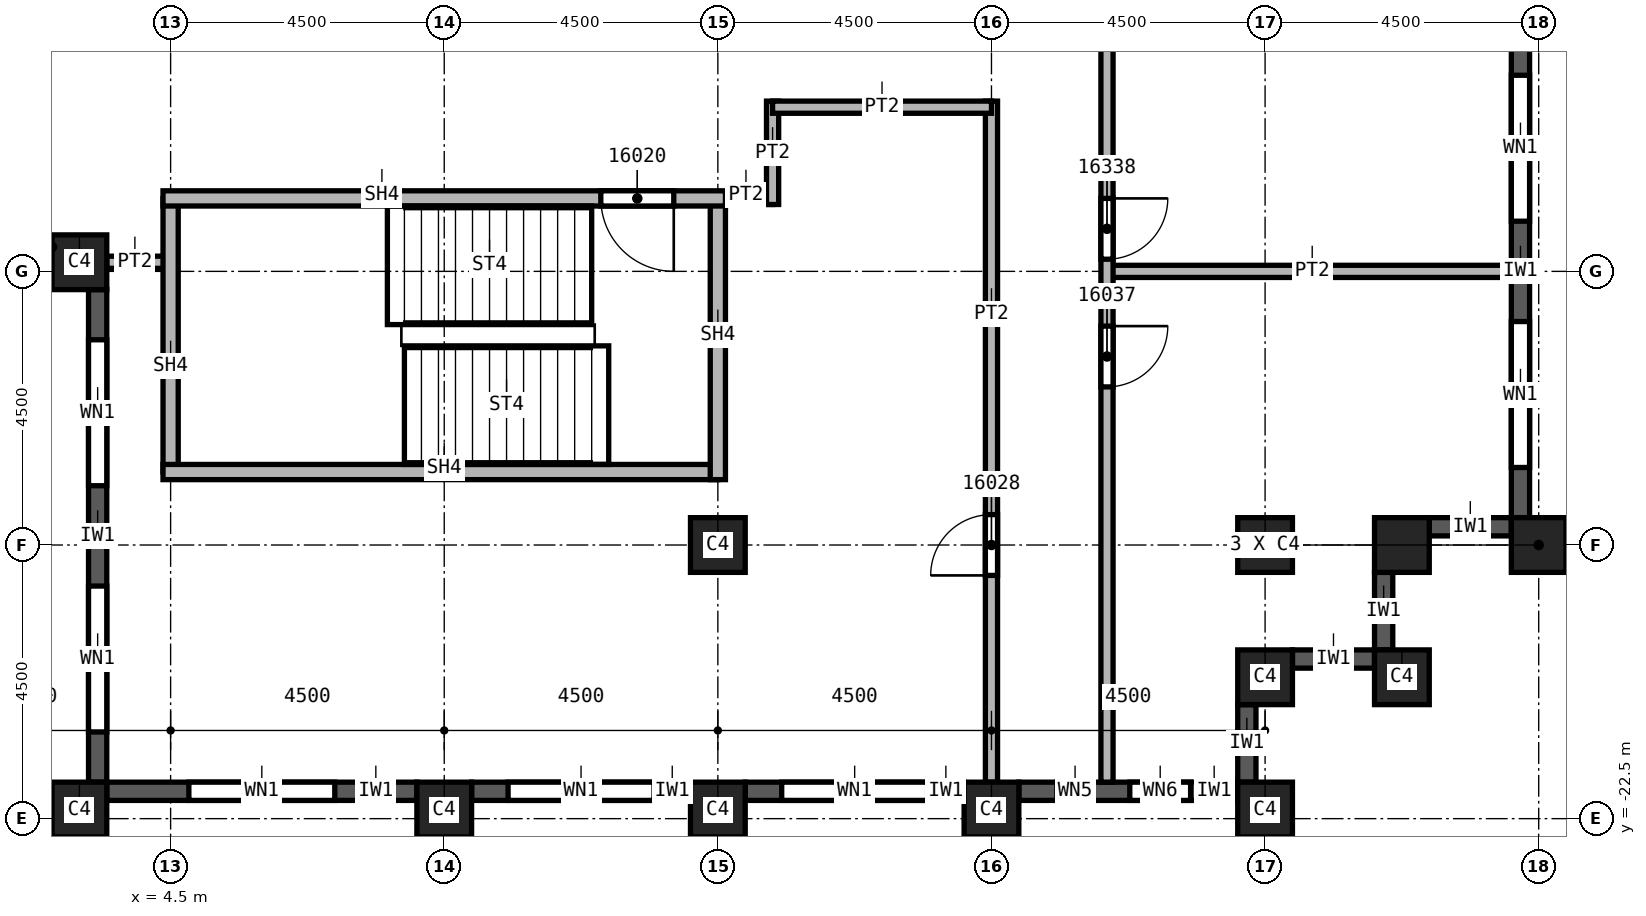
"""IFC4 building model, lengths in metres.
Left out: names, types, materials, properties, quantities, classifications, styles, units other than length and angle.
Written with IfcOpenShell. Run it as: python <this file> out.ifc"""

import sys

from ifc_helpers import new_model, si_unit, direction, frame, frame_2d, origin, origin_2d, place, context, subcontext, project, spatial, rectangle, extrude, element, fill, save


model = new_model("IFC4")
c1 = context("Model", 3, precision=1e-05, world=origin(), true_north=direction((0.0, 1.0)))
c2 = subcontext(c1, "Body", "Model", "MODEL_VIEW")
j1 = project(units=[si_unit("LENGTHUNIT", "METRE"), si_unit("PLANEANGLEUNIT", "RADIAN")], contexts=[c1])
p1 = place(None, origin())
s1 = spatial("IfcSite", under=j1, at=p1, CompositionType="ELEMENT")
p2 = place(p1, origin())
s2 = spatial("IfcBuilding", under=s1, at=p2, CompositionType="ELEMENT")
p3 = place(p2, frame((0.0, 0.0, 246.0)))
s3 = spatial("IfcBuildingStorey", under=s2, at=p3, CompositionType="ELEMENT", Elevation=246.0)
for number, where, z_axis, x_axis in (
    (1, (13.5, -18.0, 0.0), (0.0, 0.0, 1.0), (1.0, 0.0, 0.0)),
    (2, (22.5, -18.0, 0.0), (0.0, 0.0, 1.0), (1.0, 0.0, 0.0)),
    (3, (27.0, -18.0, 0.0), (0.0, 0.0, 1.0), (0.0, 1.0, 0.0)),
    (4, (3.0, -22.35, 0.0), (0.0, 0.0, 1.0), (1.0, 0.0, 0.0)),
    (5, (9.0, -22.35, 0.0), (0.0, 0.0, 1.0), (1.0, 0.0, 0.0)),
    (6, (13.5, -22.35, 0.0), (0.0, 0.0, 1.0), (1.0, 0.0, 0.0)),
    (7, (18.0, -22.35, 0.0), (0.0, 0.0, 1.0), (1.0, 0.0, 0.0)),
    (8, (22.5, -22.35, 0.0), (0.0, 0.0, 1.0), (1.0, 0.0, 0.0)),
    (9, (3.0, -13.35, 0.0), (0.0, 0.0, 1.0), (1.0, 0.0, 0.0)),
    (10, (22.5, -20.175, 0.0), (0.0, 0.0, 1.0), (1.0, 0.0, 0.0)),
    (11, (24.75, -20.175, 0.0), (0.0, 0.0, 1.0), (1.0, 0.0, 0.0)),
    (12, (24.75, -18.0, 0.0), (0.0, 0.0, 1.0), (1.0, 0.0, 0.0)),
):
    element("IfcColumn", number, at=place(p3, frame(where, z_axis=z_axis, x_axis=x_axis)), inside=s3, PredefinedType="COLUMN", context=c2, shape_type="SweptSolid", body=[
        extrude(rectangle(XDim=0.9, YDim=0.9, at=origin_2d()), origin(), (0.0, 0.0, 1.0), 3.72),
    ])
p4 = place(p3, frame((3.3, -13.8, 0.0), z_axis=(0.0, 0.0, 1.0), x_axis=(0.0, -1.0, 0.0)))
e13 = element("IfcWall", 13, at=p4, inside=s3, PredefinedType="SOLIDWALL", context=c2, shape_type="SweptSolid", body=[
    extrude(rectangle(XDim=8.1, YDim=0.3, at=frame_2d((4.05, 0.0))), origin(), (0.0, 0.0, 1.0), 3.12),
])
p5 = place(p4, frame((0.825, 0.0, 0.8)))
e14 = element("IfcOpeningElement", 14, at=p5, cuts=e13, PredefinedType="OPENING", context=c2, shape_type="SweptSolid", body=[
    extrude(rectangle(XDim=2.4, YDim=1.95, at=frame_2d((1.2, 0.975))), frame((0.0, 0.15, 0.0), z_axis=(0.0, -1.0, 0.0), x_axis=(1.0, 0.0, 0.0)), (0.0, 0.0, 1.0), 0.3),
])
p6 = place(p4, frame((4.875, 0.0, 0.8)))
e15 = element("IfcOpeningElement", 15, at=p6, cuts=e13, PredefinedType="OPENING", context=c2, shape_type="SweptSolid", body=[
    extrude(rectangle(XDim=2.4, YDim=1.95, at=frame_2d((1.2, 0.975))), frame((0.0, 0.15, 0.0), z_axis=(0.0, -1.0, 0.0), x_axis=(1.0, 0.0, 0.0)), (0.0, 0.0, 1.0), 0.3),
])
p7 = place(p3, frame((3.45, -22.05, 0.0), z_axis=(0.0, 0.0, 1.0), x_axis=(1.0, 0.0, 0.0)))
e16 = element("IfcWall", 16, at=p7, inside=s3, PredefinedType="SOLIDWALL", context=c2, shape_type="SweptSolid", body=[
    extrude(rectangle(XDim=5.1, YDim=0.3, at=frame_2d((2.55, 0.0))), origin(), (0.0, 0.0, 1.0), 3.12),
])
p8 = place(p7, frame((1.35, 0.0, 0.8)))
e17 = element("IfcOpeningElement", 17, at=p8, cuts=e16, PredefinedType="OPENING", context=c2, shape_type="SweptSolid", body=[
    extrude(rectangle(XDim=2.4, YDim=1.95, at=frame_2d((1.2, 0.975))), frame((0.0, 0.15, 0.0), z_axis=(0.0, -1.0, 0.0), x_axis=(1.0, 0.0, 0.0)), (0.0, 0.0, 1.0), 0.3),
])
p9 = place(p3, frame((9.45, -22.05, 0.0), z_axis=(0.0, 0.0, 1.0), x_axis=(1.0, 0.0, 0.0)))
e18 = element("IfcWall", 18, at=p9, inside=s3, PredefinedType="SOLIDWALL", context=c2, shape_type="SweptSolid", body=[
    extrude(rectangle(XDim=3.6, YDim=0.3, at=frame_2d((1.8, 0.0))), origin(), (0.0, 0.0, 1.0), 3.12),
])
p10 = place(p9, frame((0.6, 0.0, 0.8)))
e19 = element("IfcOpeningElement", 19, at=p10, cuts=e18, PredefinedType="OPENING", context=c2, shape_type="SweptSolid", body=[
    extrude(rectangle(XDim=2.4, YDim=1.95, at=frame_2d((1.2, 0.975))), frame((0.0, 0.15, 0.0), z_axis=(0.0, -1.0, 0.0), x_axis=(1.0, 0.0, 0.0)), (0.0, 0.0, 1.0), 0.3),
])
p11 = place(p3, frame((13.95, -22.05, 0.0), z_axis=(0.0, 0.0, 1.0), x_axis=(1.0, 0.0, 0.0)))
e20 = element("IfcWall", 20, at=p11, inside=s3, PredefinedType="SOLIDWALL", context=c2, shape_type="SweptSolid", body=[
    extrude(rectangle(XDim=3.6, YDim=0.3, at=frame_2d((1.8, 0.0))), origin(), (0.0, 0.0, 1.0), 3.12),
])
p12 = place(p11, frame((0.6, 0.0, 0.8)))
e21 = element("IfcOpeningElement", 21, at=p12, cuts=e20, PredefinedType="OPENING", context=c2, shape_type="SweptSolid", body=[
    extrude(rectangle(XDim=2.4, YDim=1.95, at=frame_2d((1.2, 0.975))), frame((0.0, 0.15, 0.0), z_axis=(0.0, -1.0, 0.0), x_axis=(1.0, 0.0, 0.0)), (0.0, 0.0, 1.0), 0.3),
])
p13 = place(p3, frame((18.45, -22.05, 0.0), z_axis=(0.0, 0.0, 1.0), x_axis=(1.0, 0.0, 0.0)))
e22 = element("IfcWall", 22, at=p13, inside=s3, PredefinedType="SOLIDWALL", context=c2, shape_type="SweptSolid", body=[
    extrude(rectangle(XDim=3.6, YDim=0.3, at=frame_2d((1.8, 0.0))), origin(), (0.0, 0.0, 1.0), 3.12),
])
p14 = place(p13, frame((0.625, 0.0, 0.8)))
e23 = element("IfcOpeningElement", 23, at=p14, cuts=e22, PredefinedType="OPENING", context=c2, shape_type="SweptSolid", body=[
    extrude(rectangle(XDim=0.6, YDim=1.95, at=frame_2d((0.3, 0.975))), frame((0.0, 0.15, 0.0), z_axis=(0.0, -1.0, 0.0), x_axis=(1.0, 0.0, 0.0)), (0.0, 0.0, 1.0), 0.3),
])
p15 = place(p13, frame((1.825, 0.0, 0.8)))
e24 = element("IfcOpeningElement", 24, at=p15, cuts=e22, PredefinedType="OPENING", context=c2, shape_type="SweptSolid", body=[
    extrude(rectangle(XDim=1.0, YDim=1.95, at=frame_2d((0.5, 0.975))), frame((0.0, 0.15, 0.0), z_axis=(0.0, -1.0, 0.0), x_axis=(1.0, 0.0, 0.0)), (0.0, 0.0, 1.0), 0.3),
])
p16 = place(p3, frame((22.2, -21.9, 0.0), z_axis=(0.0, 0.0, 1.0), x_axis=(0.0, 1.0, 0.0)))
e25 = element("IfcWall", 25, at=p16, inside=s3, PredefinedType="SOLIDWALL", context=c2, shape_type="SweptSolid", body=[
    extrude(rectangle(XDim=1.275, YDim=0.3, at=frame_2d((0.637, 0.0))), origin(), (0.0, 0.0, 1.0), 3.12),
])
p17 = place(p3, frame((22.95, -19.875, 0.0), z_axis=(0.0, 0.0, 1.0), x_axis=(1.0, 0.0, 0.0)))
e26 = element("IfcWall", 26, at=p17, inside=s3, PredefinedType="SOLIDWALL", context=c2, shape_type="SweptSolid", body=[
    extrude(rectangle(XDim=1.35, YDim=0.3, at=frame_2d((0.675, 0.0))), origin(), (0.0, 0.0, 1.0), 3.12),
])
p18 = place(p3, frame((24.45, -19.725, 0.0), z_axis=(0.0, 0.0, 1.0), x_axis=(0.0, 1.0, 0.0)))
e27 = element("IfcWall", 27, at=p18, inside=s3, PredefinedType="SOLIDWALL", context=c2, shape_type="SweptSolid", body=[
    extrude(rectangle(XDim=1.275, YDim=0.3, at=frame_2d((0.638, 0.0))), origin(), (0.0, 0.0, 1.0), 3.12),
])
p19 = place(p3, frame((25.2, -17.7, 0.0), z_axis=(0.0, 0.0, 1.0), x_axis=(1.0, 0.0, 0.0)))
e28 = element("IfcWall", 28, at=p19, inside=s3, PredefinedType="SOLIDWALL", context=c2, shape_type="SweptSolid", body=[
    extrude(rectangle(XDim=1.35, YDim=0.3, at=frame_2d((0.675, 0.0))), origin(), (0.0, 0.0, 1.0), 3.12),
])
p20 = place(p3, frame((26.7, -17.55, 0.0), z_axis=(0.0, 0.0, 1.0), x_axis=(0.0, 1.0, 0.0)))
e29 = element("IfcWall", 29, at=p20, inside=s3, PredefinedType="SOLIDWALL", context=c2, shape_type="SweptSolid", body=[
    extrude(rectangle(XDim=8.1, YDim=0.3, at=frame_2d((4.05, 0.0))), origin(), (0.0, 0.0, 1.0), 3.12),
])
p21 = place(p20, frame((0.825, 0.0, 0.8)))
e30 = element("IfcOpeningElement", 30, at=p21, cuts=e29, PredefinedType="OPENING", context=c2, shape_type="SweptSolid", body=[
    extrude(rectangle(XDim=2.4, YDim=1.95, at=frame_2d((1.2, 0.975))), frame((0.0, 0.15, 0.0), z_axis=(0.0, -1.0, 0.0), x_axis=(1.0, 0.0, 0.0)), (0.0, 0.0, 1.0), 0.3),
])
p22 = place(p20, frame((4.875, 0.0, 0.8)))
e31 = element("IfcOpeningElement", 31, at=p22, cuts=e29, PredefinedType="OPENING", context=c2, shape_type="SweptSolid", body=[
    extrude(rectangle(XDim=2.4, YDim=1.95, at=frame_2d((1.2, 0.975))), frame((0.0, 0.15, 0.0), z_axis=(0.0, -1.0, 0.0), x_axis=(1.0, 0.0, 0.0)), (0.0, 0.0, 1.0), 0.3),
])
p23 = place(p3, frame((4.5, -13.35, 0.0), z_axis=(0.0, 0.0, 1.0), x_axis=(-1.0, 0.0, 0.0)))
e32 = element("IfcWall", 32, at=p23, inside=s3, PredefinedType="PARTITIONING", context=c2, shape_type="SweptSolid", body=[
    extrude(rectangle(XDim=1.05, YDim=0.2, at=frame_2d((0.525, 0.0))), origin(), (0.0, 0.0, 1.0), 3.72),
])
p24 = place(p3, frame((14.4, -12.3, 0.0), z_axis=(0.0, 0.0, 1.0), x_axis=(-1.0, 0.0, 0.0)))
e33 = element("IfcWall", 33, at=p24, inside=s3, PredefinedType="PARTITIONING", context=c2, shape_type="SweptSolid", body=[
    extrude(rectangle(XDim=1.025, YDim=0.2, at=frame_2d((0.512, 0.0))), origin(), (0.0, 0.0, 1.0), 3.72),
])
p25 = place(p3, frame((14.4, -10.7, 0.0), z_axis=(0.0, 0.0, 1.0), x_axis=(0.0, -1.0, 0.0)))
e34 = element("IfcWall", 34, at=p25, inside=s3, PredefinedType="PARTITIONING", context=c2, shape_type="SweptSolid", body=[
    extrude(rectangle(XDim=1.7, YDim=0.2, at=frame_2d((0.85, 0.0))), origin(), (0.0, 0.0, 1.0), 3.72),
])
p26 = place(p3, frame((18.0, -21.9, 0.0), z_axis=(0.0, 0.0, 1.0), x_axis=(0.0, 1.0, 0.0)))
e35 = element("IfcWall", 35, at=p26, inside=s3, PredefinedType="PARTITIONING", context=c2, shape_type="SweptSolid", body=[
    extrude(rectangle(XDim=11.2, YDim=0.2, at=frame_2d((5.6, 0.0))), origin(), (0.0, 0.0, 1.0), 3.72),
])
p27 = place(p26, frame((3.4, 0.0, 0.0)))
e36 = element("IfcOpeningElement", 36, at=p27, cuts=e35, PredefinedType="OPENING", context=c2, shape_type="SweptSolid", body=[
    extrude(rectangle(XDim=1.0, YDim=2.1, at=frame_2d((0.5, 1.05))), frame((0.0, 0.1, 0.0), z_axis=(0.0, -1.0, 0.0), x_axis=(1.0, 0.0, 0.0)), (0.0, 0.0, 1.0), 0.2),
])
p28 = place(p3, frame((18.0, -10.8, 0.0), z_axis=(0.0, 0.0, 1.0), x_axis=(-1.0, 0.0, 0.0)))
e37 = element("IfcWall", 37, at=p28, inside=s3, PredefinedType="PARTITIONING", context=c2, shape_type="SweptSolid", body=[
    extrude(rectangle(XDim=3.6, YDim=0.2, at=frame_2d((1.8, 0.0))), origin(), (0.0, 0.0, 1.0), 3.72),
])
p29 = place(p3, frame((19.9, -13.5, 0.0), z_axis=(0.0, 0.0, 1.0), x_axis=(1.0, 0.0, 0.0)))
e38 = element("IfcWall", 38, at=p29, inside=s3, PredefinedType="PARTITIONING", context=c2, shape_type="SweptSolid", body=[
    extrude(rectangle(XDim=6.65, YDim=0.2, at=frame_2d((3.325, 0.0))), origin(), (0.0, 0.0, 1.0), 3.72),
])
p30 = place(p3, frame((19.9, 21.9, 0.0), z_axis=(0.0, 0.0, 1.0), x_axis=(0.0, -1.0, 0.0)))
e39 = element("IfcWall", 39, at=p30, inside=s3, PredefinedType="PARTITIONING", context=c2, shape_type="SweptSolid", body=[
    extrude(rectangle(XDim=43.8, YDim=0.2, at=frame_2d((21.9, 0.0))), origin(), (0.0, 0.0, 1.0), 3.72),
])
p31 = place(p30, frame((14.7, 0.0, 0.0)))
e40 = element("IfcOpeningElement", 40, at=p31, cuts=e39, PredefinedType="OPENING", context=c2, shape_type="SweptSolid", body=[
    extrude(rectangle(XDim=1.0, YDim=2.1, at=frame_2d((0.5, 1.05))), frame((0.0, 0.1, 0.0), z_axis=(0.0, -1.0, 0.0), x_axis=(1.0, 0.0, 0.0)), (0.0, 0.0, 1.0), 0.2),
])
p32 = place(p30, frame((1.9, 0.0, 0.0)))
e41 = element("IfcOpeningElement", 41, at=p32, cuts=e39, PredefinedType="OPENING", context=c2, shape_type="SweptSolid", body=[
    extrude(rectangle(XDim=1.0, YDim=2.1, at=frame_2d((0.5, 1.05))), frame((0.0, 0.1, 0.0), z_axis=(0.0, -1.0, 0.0), x_axis=(1.0, 0.0, 0.0)), (0.0, 0.0, 1.0), 0.2),
])
p33 = place(p30, frame((36.3, 0.0, 0.0)))
e42 = element("IfcOpeningElement", 42, at=p33, cuts=e39, PredefinedType="OPENING", context=c2, shape_type="SweptSolid", body=[
    extrude(rectangle(XDim=1.0, YDim=2.1, at=frame_2d((0.5, 1.05))), frame((0.0, 0.1, 0.0), z_axis=(0.0, -1.0, 0.0), x_axis=(1.0, 0.0, 0.0)), (0.0, 0.0, 1.0), 0.2),
])
p34 = place(p30, frame((34.2, 0.0, 0.0)))
e43 = element("IfcOpeningElement", 43, at=p34, cuts=e39, PredefinedType="OPENING", context=c2, shape_type="SweptSolid", body=[
    extrude(rectangle(XDim=1.0, YDim=2.1, at=frame_2d((0.5, 1.05))), frame((0.0, 0.1, 0.0), z_axis=(0.0, -1.0, 0.0), x_axis=(1.0, 0.0, 0.0)), (0.0, 0.0, 1.0), 0.2),
])
p35 = place(p30, frame((26.55, 0.0, 0.0)))
e44 = element("IfcOpeningElement", 44, at=p35, cuts=e39, PredefinedType="OPENING", context=c2, shape_type="SweptSolid", body=[
    extrude(rectangle(XDim=1.0, YDim=2.1, at=frame_2d((0.5, 1.05))), frame((0.0, 0.1, 0.0), z_axis=(0.0, -1.0, 0.0), x_axis=(1.0, 0.0, 0.0)), (0.0, 0.0, 1.0), 0.2),
])
p36 = place(p3, frame((4.5, -16.8, 0.0), z_axis=(0.0, 0.0, 1.0), x_axis=(0.0, 1.0, 0.0)))
e45 = element("IfcWall", 45, at=p36, inside=s3, PredefinedType="SOLIDWALL", context=c2, shape_type="SweptSolid", body=[
    extrude(rectangle(XDim=4.5, YDim=0.25, at=frame_2d((2.25, 0.0))), origin(), (0.0, 0.0, 1.0), 3.72),
])
p37 = place(p3, frame((13.5, -16.8, 0.0), z_axis=(0.0, 0.0, 1.0), x_axis=(-1.0, 0.0, 0.0)))
e46 = element("IfcWall", 46, at=p37, inside=s3, PredefinedType="SOLIDWALL", context=c2, shape_type="SweptSolid", body=[
    extrude(rectangle(XDim=9.125, YDim=0.25, at=frame_2d((4.562, 0.0))), origin(), (0.0, 0.0, 1.0), 3.72),
])
p38 = place(p3, frame((13.5, -12.3, 0.0), z_axis=(0.0, 0.0, 1.0), x_axis=(0.0, -1.0, 0.0)))
e47 = element("IfcWall", 47, at=p38, inside=s3, PredefinedType="SOLIDWALL", context=c2, shape_type="SweptSolid", body=[
    extrude(rectangle(XDim=4.625, YDim=0.25, at=frame_2d((2.312, 0.0))), origin(), (0.0, 0.0, 1.0), 3.72),
])
p39 = place(p3, frame((13.625, -12.3, 0.0), z_axis=(0.0, 0.0, 1.0), x_axis=(-1.0, 0.0, 0.0)))
e48 = element("IfcWall", 48, at=p39, inside=s3, PredefinedType="SOLIDWALL", context=c2, shape_type="SweptSolid", body=[
    extrude(rectangle(XDim=9.25, YDim=0.25, at=frame_2d((4.625, 0.0))), origin(), (0.0, 0.0, 1.0), 3.72),
])
p40 = place(p39, frame((0.85, 0.0, 0.0)))
e49 = element("IfcOpeningElement", 49, at=p40, cuts=e48, PredefinedType="OPENING", context=c2, shape_type="SweptSolid", body=[
    extrude(rectangle(XDim=1.2, YDim=2.1, at=frame_2d((0.6, 1.05))), frame((0.0, 0.125, 0.0), z_axis=(0.0, -1.0, 0.0), x_axis=(1.0, 0.0, 0.0)), (0.0, 0.0, 1.0), 0.25),
])
p41 = place(p5, origin())
e50 = element("IfcWindow", 50, at=p41, inside=s3, PartitioningType="SINGLE_PANEL", PredefinedType="WINDOW", context=c2, shape_type="SweptSolid", body=[
    extrude(rectangle(XDim=2.4, YDim=1.95, at=frame_2d((1.2, 0.975))), frame((0.0, 0.03, 0.0), z_axis=(0.0, -1.0, 0.0), x_axis=(1.0, 0.0, 0.0)), (0.0, 0.0, 1.0), 0.06),
])
fill(e14, e50)
p42 = place(p6, origin())
e51 = element("IfcWindow", 51, at=p42, inside=s3, PartitioningType="SINGLE_PANEL", PredefinedType="WINDOW", context=c2, shape_type="SweptSolid", body=[
    extrude(rectangle(XDim=2.4, YDim=1.95, at=frame_2d((1.2, 0.975))), frame((0.0, 0.03, 0.0), z_axis=(0.0, -1.0, 0.0), x_axis=(1.0, 0.0, 0.0)), (0.0, 0.0, 1.0), 0.06),
])
fill(e15, e51)
p43 = place(p8, origin())
e52 = element("IfcWindow", 52, at=p43, inside=s3, PartitioningType="SINGLE_PANEL", PredefinedType="WINDOW", context=c2, shape_type="SweptSolid", body=[
    extrude(rectangle(XDim=2.4, YDim=1.95, at=frame_2d((1.2, 0.975))), frame((0.0, 0.03, 0.0), z_axis=(0.0, -1.0, 0.0), x_axis=(1.0, 0.0, 0.0)), (0.0, 0.0, 1.0), 0.06),
])
fill(e17, e52)
p44 = place(p10, origin())
e53 = element("IfcWindow", 53, at=p44, inside=s3, PartitioningType="SINGLE_PANEL", PredefinedType="WINDOW", context=c2, shape_type="SweptSolid", body=[
    extrude(rectangle(XDim=2.4, YDim=1.95, at=frame_2d((1.2, 0.975))), frame((0.0, 0.03, 0.0), z_axis=(0.0, -1.0, 0.0), x_axis=(1.0, 0.0, 0.0)), (0.0, 0.0, 1.0), 0.06),
])
fill(e19, e53)
p45 = place(p12, origin())
e54 = element("IfcWindow", 54, at=p45, inside=s3, PartitioningType="SINGLE_PANEL", PredefinedType="WINDOW", context=c2, shape_type="SweptSolid", body=[
    extrude(rectangle(XDim=2.4, YDim=1.95, at=frame_2d((1.2, 0.975))), frame((0.0, 0.03, 0.0), z_axis=(0.0, -1.0, 0.0), x_axis=(1.0, 0.0, 0.0)), (0.0, 0.0, 1.0), 0.06),
])
fill(e21, e54)
p46 = place(p21, origin())
e55 = element("IfcWindow", 55, at=p46, inside=s3, PartitioningType="SINGLE_PANEL", PredefinedType="WINDOW", context=c2, shape_type="SweptSolid", body=[
    extrude(rectangle(XDim=2.4, YDim=1.95, at=frame_2d((1.2, 0.975))), frame((0.0, 0.03, 0.0), z_axis=(0.0, -1.0, 0.0), x_axis=(1.0, 0.0, 0.0)), (0.0, 0.0, 1.0), 0.06),
])
fill(e30, e55)
p47 = place(p22, origin())
e56 = element("IfcWindow", 56, at=p47, inside=s3, PartitioningType="SINGLE_PANEL", PredefinedType="WINDOW", context=c2, shape_type="SweptSolid", body=[
    extrude(rectangle(XDim=2.4, YDim=1.95, at=frame_2d((1.2, 0.975))), frame((0.0, 0.03, 0.0), z_axis=(0.0, -1.0, 0.0), x_axis=(1.0, 0.0, 0.0)), (0.0, 0.0, 1.0), 0.06),
])
fill(e31, e56)
p48 = place(p40, origin())
e57 = element("IfcDoor", 57, at=p48, inside=s3, OperationType="SINGLE_SWING_LEFT", PredefinedType="DOOR", context=c2, shape_type="SweptSolid", body=[
    extrude(rectangle(XDim=1.2, YDim=2.1, at=frame_2d((0.6, 1.05))), frame((0.0, 0.025, 0.0), z_axis=(0.0, -1.0, 0.0), x_axis=(1.0, 0.0, 0.0)), (0.0, 0.0, 1.0), 0.05),
])
fill(e49, e57)
p49 = place(p27, origin())
e58 = element("IfcDoor", 58, at=p49, inside=s3, OperationType="SINGLE_SWING_LEFT", PredefinedType="DOOR", context=c2, shape_type="SweptSolid", body=[
    extrude(rectangle(XDim=1.0, YDim=2.1, at=frame_2d((0.5, 1.05))), frame((0.0, 0.025, 0.0), z_axis=(0.0, -1.0, 0.0), x_axis=(1.0, 0.0, 0.0)), (0.0, 0.0, 1.0), 0.05),
])
fill(e36, e58)
p50 = place(p33, origin())
e59 = element("IfcDoor", 59, at=p50, inside=s3, OperationType="SINGLE_SWING_RIGHT", PredefinedType="DOOR", context=c2, shape_type="SweptSolid", body=[
    extrude(rectangle(XDim=1.0, YDim=2.1, at=frame_2d((0.5, 1.05))), frame((0.0, 0.025, 0.0), z_axis=(0.0, -1.0, 0.0), x_axis=(1.0, 0.0, 0.0)), (0.0, 0.0, 1.0), 0.05),
])
fill(e42, e59)
p51 = place(p34, origin())
e60 = element("IfcDoor", 60, at=p51, inside=s3, OperationType="SINGLE_SWING_LEFT", PredefinedType="DOOR", context=c2, shape_type="SweptSolid", body=[
    extrude(rectangle(XDim=1.0, YDim=2.1, at=frame_2d((0.5, 1.05))), frame((0.0, 0.025, 0.0), z_axis=(0.0, -1.0, 0.0), x_axis=(1.0, 0.0, 0.0)), (0.0, 0.0, 1.0), 0.05),
])
fill(e43, e60)
p52 = place(p14, origin())
e61 = element("IfcWindow", 61, at=p52, inside=s3, PartitioningType="SINGLE_PANEL", PredefinedType="WINDOW", context=c2, shape_type="SweptSolid", body=[
    extrude(rectangle(XDim=0.6, YDim=1.95, at=frame_2d((0.3, 0.975))), frame((0.0, 0.03, 0.0), z_axis=(0.0, -1.0, 0.0), x_axis=(1.0, 0.0, 0.0)), (0.0, 0.0, 1.0), 0.06),
])
fill(e23, e61)
p53 = place(p15, origin())
e62 = element("IfcWindow", 62, at=p53, inside=s3, PartitioningType="SINGLE_PANEL", PredefinedType="WINDOW", context=c2, shape_type="SweptSolid", body=[
    extrude(rectangle(XDim=1.0, YDim=1.95, at=frame_2d((0.5, 0.975))), frame((0.0, 0.03, 0.0), z_axis=(0.0, -1.0, 0.0), x_axis=(1.0, 0.0, 0.0)), (0.0, 0.0, 1.0), 0.06),
])
fill(e24, e62)
save(model, sys.argv[1])
